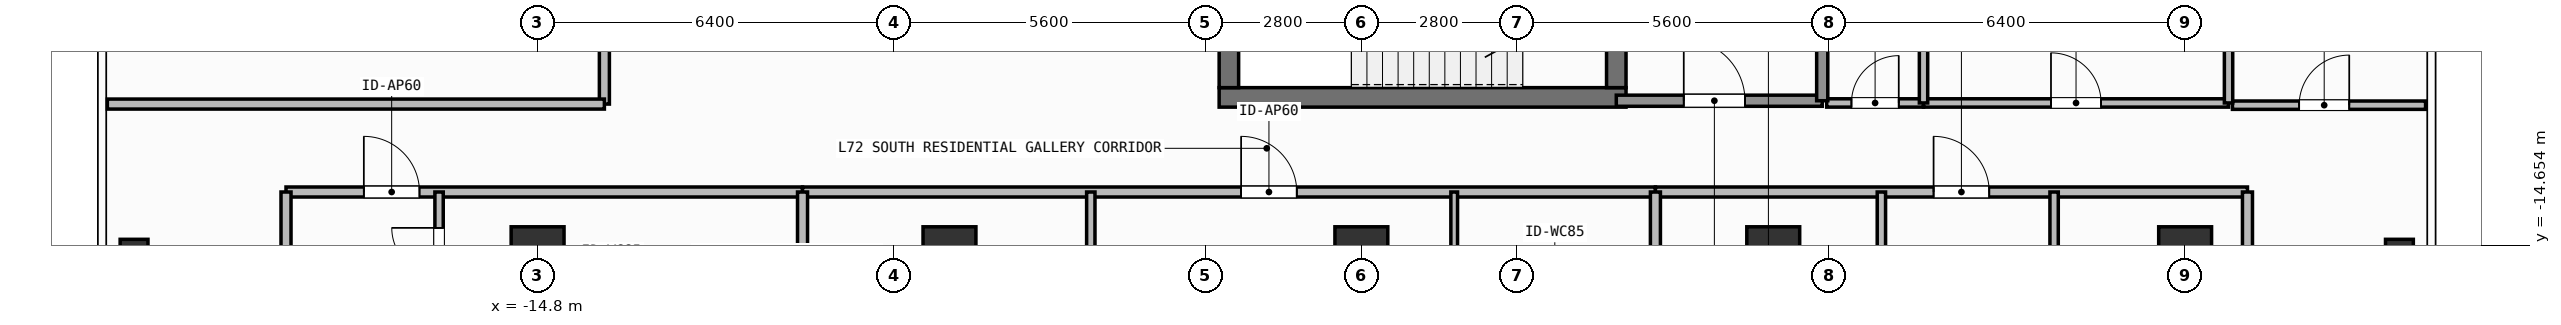
"""IFC4 building model, lengths in metres.
Left out: names, types, materials, properties, quantities, classifications, styles, units other than length and angle.
Written with IfcOpenShell. Run it as: python <this file> out.ifc"""

import sys

from ifc_helpers import new_model, si_unit, direction, frame, frame_2d, origin, origin_2d, place, context, subcontext, project, spatial, rectangle, hollow_rectangle, extrude, element, fill, save


model = new_model("IFC4")
c1 = context("Model", 3, precision=1e-05, world=origin(), true_north=direction((0.0, 1.0)))
c2 = subcontext(c1, "Body", "Model", "MODEL_VIEW")
j1 = project(units=[si_unit("LENGTHUNIT", "METRE"), si_unit("PLANEANGLEUNIT", "RADIAN")], contexts=[c1])
p1 = place(None, origin())
s1 = spatial("IfcSite", under=j1, at=p1, CompositionType="ELEMENT")
p2 = place(p1, origin())
s2 = spatial("IfcBuilding", under=s1, at=p2, CompositionType="ELEMENT")
p3 = place(p2, frame((0.0, 0.0, 293.7)))
s3 = spatial("IfcBuildingStorey", under=s2, at=p3, CompositionType="ELEMENT", Elevation=293.7)
p4 = place(p3, frame((-2.555, -12.0, 0.0), z_axis=(0.0, 0.0, 1.0), x_axis=(1.0, 0.0, 0.0)))
e1 = element("IfcWall", 1, at=p4, inside=s3, PredefinedType="SHEAR", context=c2, shape_type="SweptSolid", body=[
    extrude(rectangle(XDim=7.31, YDim=0.35, at=frame_2d((3.655, 0.0))), origin(), (0.0, 0.0, 1.0), 3.9),
])
p5 = place(p3, frame((-2.38, -11.825, 0.0), z_axis=(0.0, 0.0, 1.0), x_axis=(0.0, 1.0, 0.0)))
e2 = element("IfcWall", 2, at=p5, inside=s3, PredefinedType="SHEAR", context=c2, shape_type="SweptSolid", body=[
    extrude(rectangle(XDim=2.925, YDim=0.35, at=frame_2d((1.462, 0.0))), origin(), (0.0, 0.0, 1.0), 3.9),
])
p6 = place(p3, frame((4.58, -8.9, 0.0), z_axis=(0.0, 0.0, 1.0), x_axis=(0.0, -1.0, 0.0)))
e3 = element("IfcWall", 3, at=p6, inside=s3, PredefinedType="SHEAR", context=c2, shape_type="SweptSolid", body=[
    extrude(rectangle(XDim=2.925, YDim=0.35, at=frame_2d((1.462, 0.0))), origin(), (0.0, 0.0, 1.0), 3.9),
])
p7 = place(p6, frame((0.913, 0.0, 0.0)))
e4 = element("IfcOpeningElement", 4, at=p7, cuts=e3, PredefinedType="OPENING", context=c2, shape_type="SweptSolid", body=[
    extrude(rectangle(XDim=1.1, YDim=2.15, at=frame_2d((0.55, 1.075))), frame((0.0, 0.185, 0.0), z_axis=(0.0, -1.0, 0.0), x_axis=(1.0, 0.0, 0.0)), (0.0, 0.0, 1.0), 0.37),
])
for number, where, z_axis, x_axis in (
    (5, (-14.8, -14.8, 0.0), (0.0, 0.0, 1.0), (1.0, 0.0, 0.0)),
    (6, (-7.4, -14.8, 0.0), (0.0, 0.0, 1.0), (1.0, 0.0, 0.0)),
    (7, (0.0, -14.8, 0.0), (0.0, 0.0, 1.0), (1.0, 0.0, 0.0)),
    (8, (7.4, -14.8, 0.0), (0.0, 0.0, 1.0), (1.0, 0.0, 0.0)),
    (9, (14.8, -14.8, 0.0), (0.0, 0.0, 1.0), (1.0, 0.0, 0.0)),
):
    element("IfcColumn", number, at=place(p3, frame(where, z_axis=z_axis, x_axis=x_axis)), inside=s3, PredefinedType="COLUMN", context=c2, shape_type="SweptSolid", body=[
        extrude(rectangle(XDim=0.95, YDim=0.95, at=origin_2d()), origin(), (0.0, 0.0, 1.0), 3.9),
    ])
for number, where, z_axis, x_axis in (
    (10, (-22.05, -14.8, 0.0), (0.0, 0.0, 1.0), (1.0, 0.0, 0.0)),
    (11, (18.65, -14.8, 0.0), (0.0, 0.0, 1.0), (1.0, 0.0, 0.0)),
):
    element("IfcColumn", number, at=place(p3, frame(where, z_axis=z_axis, x_axis=x_axis)), inside=s3, PredefinedType="COLUMN", context=c2, shape_type="SweptSolid", body=[
        extrude(hollow_rectangle(XDim=0.5, YDim=0.5, WallThickness=0.025, at=origin_2d()), origin(), (0.0, 0.0, 1.0), 3.9),
    ])
p8 = place(p3, frame((4.58, -12.06, 0.0), z_axis=(0.0, 0.0, 1.0), x_axis=(1.0, 0.0, 0.0)))
e12 = element("IfcWall", 12, at=p8, inside=s3, PredefinedType="SOLIDWALL", context=c2, shape_type="SweptSolid", body=[
    extrude(rectangle(XDim=3.7, YDim=0.2, at=frame_2d((1.85, 0.0))), origin(), (0.0, 0.0, 1.0), 3.68),
])
p9 = place(p8, frame((1.212, 0.0, 0.0)))
e13 = element("IfcOpeningElement", 13, at=p9, cuts=e12, PredefinedType="OPENING", context=c2, shape_type="SweptSolid", body=[
    extrude(rectangle(XDim=1.1, YDim=2.15, at=frame_2d((0.55, 1.075))), frame((0.0, 0.11, 0.0), z_axis=(0.0, -1.0, 0.0), x_axis=(1.0, 0.0, 0.0)), (0.0, 0.0, 1.0), 0.22),
])
p10 = place(p3, frame((8.36, -12.1, 0.0), z_axis=(0.0, 0.0, 1.0), x_axis=(1.0, 0.0, 0.0)))
e14 = element("IfcWall", 14, at=p10, inside=s3, PredefinedType="PARTITIONING", context=c2, shape_type="SweptSolid", body=[
    extrude(rectangle(XDim=1.74, YDim=0.15, at=frame_2d((0.87, 0.0))), origin(), (0.0, 0.0, 1.0), 3.68),
])
p11 = place(p10, frame((0.445, 0.0, 0.0)))
e15 = element("IfcOpeningElement", 15, at=p11, cuts=e14, PredefinedType="OPENING", context=c2, shape_type="SweptSolid", body=[
    extrude(rectangle(XDim=0.85, YDim=2.1, at=frame_2d((0.425, 1.05))), frame((0.0, 0.085, 0.0), z_axis=(0.0, -1.0, 0.0), x_axis=(1.0, 0.0, 0.0)), (0.0, 0.0, 1.0), 0.17),
])
p12 = place(p3, frame((10.1, -12.1, 0.0), z_axis=(0.0, 0.0, 1.0), x_axis=(1.0, 0.0, 0.0)))
e16 = element("IfcWall", 16, at=p12, inside=s3, PredefinedType="PARTITIONING", context=c2, shape_type="SweptSolid", body=[
    extrude(rectangle(XDim=5.48, YDim=0.15, at=frame_2d((2.74, 0.0))), origin(), (0.0, 0.0, 1.0), 3.68),
])
p13 = place(p12, frame((2.29, 0.0, 0.0)))
e17 = element("IfcOpeningElement", 17, at=p13, cuts=e16, PredefinedType="OPENING", context=c2, shape_type="SweptSolid", body=[
    extrude(rectangle(XDim=0.9, YDim=2.1, at=frame_2d((0.45, 1.05))), frame((0.0, 0.085, 0.0), z_axis=(0.0, -1.0, 0.0), x_axis=(1.0, 0.0, 0.0)), (0.0, 0.0, 1.0), 0.17),
])
p14 = place(p3, frame((-19.32, -13.7, 0.0), z_axis=(0.0, 0.0, 1.0), x_axis=(1.0, 0.0, 0.0)))
e18 = element("IfcWall", 18, at=p14, inside=s3, PredefinedType="PARTITIONING", context=c2, shape_type="SweptSolid", body=[
    extrude(rectangle(XDim=9.28, YDim=0.18, at=frame_2d((4.64, 0.0))), origin(), (0.0, 0.0, 1.0), 3.68),
])
p15 = place(p14, frame((1.398, 0.0, 0.0)))
e19 = element("IfcOpeningElement", 19, at=p15, cuts=e18, PredefinedType="OPENING", context=c2, shape_type="SweptSolid", body=[
    extrude(rectangle(XDim=1.0, YDim=2.2, at=frame_2d((0.5, 1.1))), frame((0.0, 0.1, 0.0), z_axis=(0.0, -1.0, 0.0), x_axis=(1.0, 0.0, 0.0)), (0.0, 0.0, 1.0), 0.2),
])
p16 = place(p3, frame((-16.57, -15.839, 0.0), z_axis=(0.0, 0.0, 1.0), x_axis=(0.0, 1.0, 0.0)))
e20 = element("IfcWall", 20, at=p16, inside=s3, PredefinedType="PARTITIONING", context=c2, shape_type="SweptSolid", body=[
    extrude(rectangle(XDim=2.139, YDim=0.15, at=frame_2d((1.07, 0.0))), origin(), (0.0, 0.0, 1.0), 3.68),
])
p17 = place(p16, frame((0.645, 0.0, 0.0)))
e21 = element("IfcOpeningElement", 21, at=p17, cuts=e20, PredefinedType="OPENING", context=c2, shape_type="SweptSolid", body=[
    extrude(rectangle(XDim=0.85, YDim=2.1, at=frame_2d((0.425, 1.05))), frame((0.0, 0.085, 0.0), z_axis=(0.0, -1.0, 0.0), x_axis=(1.0, 0.0, 0.0)), (0.0, 0.0, 1.0), 0.17),
])
p18 = place(p3, frame((-10.04, -13.7, 0.0), z_axis=(0.0, 0.0, 1.0), x_axis=(1.0, 0.0, 0.0)))
e22 = element("IfcWall", 22, at=p18, inside=s3, PredefinedType="PARTITIONING", context=c2, shape_type="SweptSolid", body=[
    extrude(rectangle(XDim=15.323, YDim=0.18, at=frame_2d((7.662, 0.0))), origin(), (0.0, 0.0, 1.0), 3.68),
])
p19 = place(p18, frame((7.88, 0.0, 0.0)))
e23 = element("IfcOpeningElement", 23, at=p19, cuts=e22, PredefinedType="OPENING", context=c2, shape_type="SweptSolid", body=[
    extrude(rectangle(XDim=1.0, YDim=2.2, at=frame_2d((0.5, 1.1))), frame((0.0, 0.1, 0.0), z_axis=(0.0, -1.0, 0.0), x_axis=(1.0, 0.0, 0.0)), (0.0, 0.0, 1.0), 0.2),
])
p20 = place(p3, frame((-4.861, -17.59, 0.0), z_axis=(0.0, 0.0, 1.0), x_axis=(0.0, 1.0, 0.0)))
e24 = element("IfcWall", 24, at=p20, inside=s3, PredefinedType="PARTITIONING", context=c2, shape_type="SweptSolid", body=[
    extrude(rectangle(XDim=3.89, YDim=0.15, at=frame_2d((1.945, 0.0))), origin(), (0.0, 0.0, 1.0), 3.68),
])
p21 = place(p20, frame((1.52, 0.0, 0.0)))
e25 = element("IfcOpeningElement", 25, at=p21, cuts=e24, PredefinedType="OPENING", context=c2, shape_type="SweptSolid", body=[
    extrude(rectangle(XDim=0.85, YDim=2.1, at=frame_2d((0.425, 1.05))), frame((0.0, 0.085, 0.0), z_axis=(0.0, -1.0, 0.0), x_axis=(1.0, 0.0, 0.0)), (0.0, 0.0, 1.0), 0.17),
])
p22 = place(p3, frame((1.668, -15.878, 0.0), z_axis=(0.0, 0.0, 1.0), x_axis=(0.0, 1.0, 0.0)))
e26 = element("IfcWall", 26, at=p22, inside=s3, PredefinedType="PARTITIONING", context=c2, shape_type="SweptSolid", body=[
    extrude(rectangle(XDim=2.178, YDim=0.12, at=frame_2d((1.089, 0.0))), origin(), (0.0, 0.0, 1.0), 3.68),
])
p23 = place(p3, frame((5.283, -13.7, 0.0), z_axis=(0.0, 0.0, 1.0), x_axis=(1.0, 0.0, 0.0)))
e27 = element("IfcWall", 27, at=p23, inside=s3, PredefinedType="PARTITIONING", context=c2, shape_type="SweptSolid", body=[
    extrude(rectangle(XDim=10.637, YDim=0.18, at=frame_2d((5.318, 0.0))), origin(), (0.0, 0.0, 1.0), 3.68),
])
p24 = place(p23, frame((4.998, 0.0, 0.0)))
e28 = element("IfcOpeningElement", 28, at=p24, cuts=e27, PredefinedType="OPENING", context=c2, shape_type="SweptSolid", body=[
    extrude(rectangle(XDim=1.0, YDim=2.2, at=frame_2d((0.5, 1.1))), frame((0.0, 0.1, 0.0), z_axis=(0.0, -1.0, 0.0), x_axis=(1.0, 0.0, 0.0)), (0.0, 0.0, 1.0), 0.2),
])
p25 = place(p3, frame((9.343, -17.461, 0.0), z_axis=(0.0, 0.0, 1.0), x_axis=(0.0, 1.0, 0.0)))
e29 = element("IfcWall", 29, at=p25, inside=s3, PredefinedType="PARTITIONING", context=c2, shape_type="SweptSolid", body=[
    extrude(rectangle(XDim=3.761, YDim=0.15, at=frame_2d((1.88, 0.0))), origin(), (0.0, 0.0, 1.0), 3.68),
])
p26 = place(p25, frame((1.369, 0.0, 0.0)))
e30 = element("IfcOpeningElement", 30, at=p26, cuts=e29, PredefinedType="OPENING", context=c2, shape_type="SweptSolid", body=[
    extrude(rectangle(XDim=0.85, YDim=2.1, at=frame_2d((0.425, 1.05))), frame((0.0, 0.085, 0.0), z_axis=(0.0, -1.0, 0.0), x_axis=(1.0, 0.0, 0.0)), (0.0, 0.0, 1.0), 0.17),
])
p27 = place(p3, frame((12.446, -17.461, 0.0), z_axis=(0.0, 0.0, 1.0), x_axis=(0.0, 1.0, 0.0)))
e31 = element("IfcWall", 31, at=p27, inside=s3, PredefinedType="PARTITIONING", context=c2, shape_type="SweptSolid", body=[
    extrude(rectangle(XDim=3.761, YDim=0.15, at=frame_2d((1.88, 0.0))), origin(), (0.0, 0.0, 1.0), 3.68),
])
p28 = place(p27, frame((1.369, 0.0, 0.0)))
e32 = element("IfcOpeningElement", 32, at=p28, cuts=e31, PredefinedType="OPENING", context=c2, shape_type="SweptSolid", body=[
    extrude(rectangle(XDim=0.85, YDim=2.1, at=frame_2d((0.425, 1.05))), frame((0.0, 0.085, 0.0), z_axis=(0.0, -1.0, 0.0), x_axis=(1.0, 0.0, 0.0)), (0.0, 0.0, 1.0), 0.17),
])
p29 = place(p3, frame((-13.6, -12.12, 0.0), z_axis=(0.0, 0.0, 1.0), x_axis=(0.0, 1.0, 0.0)))
e33 = element("IfcWall", 33, at=p29, inside=s3, PredefinedType="PARTITIONING", context=c2, shape_type="SweptSolid", body=[
    extrude(rectangle(XDim=9.68, YDim=0.18, at=frame_2d((4.84, 0.0))), origin(), (0.0, 0.0, 1.0), 3.68),
])
p30 = place(p29, frame((3.006, 0.0, 0.0)))
e34 = element("IfcOpeningElement", 34, at=p30, cuts=e33, PredefinedType="OPENING", context=c2, shape_type="SweptSolid", body=[
    extrude(rectangle(XDim=1.0, YDim=2.2, at=frame_2d((0.5, 1.1))), frame((0.0, 0.1, 0.0), z_axis=(0.0, -1.0, 0.0), x_axis=(1.0, 0.0, 0.0)), (0.0, 0.0, 1.0), 0.2),
])
p31 = place(p3, frame((15.65, -12.14, 0.0), z_axis=(0.0, 0.0, 1.0), x_axis=(1.0, 0.0, 0.0)))
e35 = element("IfcWall", 35, at=p31, inside=s3, PredefinedType="PARTITIONING", context=c2, shape_type="SweptSolid", body=[
    extrude(rectangle(XDim=3.47, YDim=0.15, at=frame_2d((1.735, 0.0))), origin(), (0.0, 0.0, 1.0), 3.68),
])
p32 = place(p31, frame((1.198, 0.0, 0.0)))
e36 = element("IfcOpeningElement", 36, at=p32, cuts=e35, PredefinedType="OPENING", context=c2, shape_type="SweptSolid", body=[
    extrude(rectangle(XDim=0.9, YDim=2.1, at=frame_2d((0.45, 1.05))), frame((0.0, 0.085, 0.0), z_axis=(0.0, -1.0, 0.0), x_axis=(1.0, 0.0, 0.0)), (0.0, 0.0, 1.0), 0.17),
])
p33 = place(p3, frame((8.28, -12.06, 0.0), z_axis=(0.0, 0.0, 1.0), x_axis=(0.0, 1.0, 0.0)))
e37 = element("IfcWall", 37, at=p33, inside=s3, PredefinedType="SOLIDWALL", context=c2, shape_type="SweptSolid", body=[
    extrude(rectangle(XDim=3.335, YDim=0.2, at=frame_2d((1.667, 0.0))), origin(), (0.0, 0.0, 1.0), 3.68),
])
p34 = place(p3, frame((10.1, -12.1, 0.0), z_axis=(0.0, 0.0, 1.0), x_axis=(0.0, 1.0, 0.0)))
e38 = element("IfcWall", 38, at=p34, inside=s3, PredefinedType="PARTITIONING", context=c2, shape_type="SweptSolid", body=[
    extrude(rectangle(XDim=2.35, YDim=0.15, at=frame_2d((1.175, 0.0))), origin(), (0.0, 0.0, 1.0), 3.68),
])
p35 = place(p3, frame((15.58, -12.1, 0.0), z_axis=(0.0, 0.0, 1.0), x_axis=(0.0, 1.0, 0.0)))
e39 = element("IfcWall", 39, at=p35, inside=s3, PredefinedType="PARTITIONING", context=c2, shape_type="SweptSolid", body=[
    extrude(rectangle(XDim=6.25, YDim=0.15, at=frame_2d((3.125, 0.0))), origin(), (0.0, 0.0, 1.0), 3.68),
])
for number, where, z_axis, x_axis in (
    (40, (-19.32, -19.51, 0.0), (0.0, 0.0, 1.0), (0.0, 1.0, 0.0)),
    (41, (15.92, -19.51, 0.0), (0.0, 0.0, 1.0), (0.0, 1.0, 0.0)),
):
    element("IfcWall", number, at=place(p3, frame(where, z_axis=z_axis, x_axis=x_axis)), inside=s3, PredefinedType="PARTITIONING", context=c2, shape_type="SweptSolid", body=[
        extrude(rectangle(XDim=5.81, YDim=0.18, at=frame_2d((2.905, 0.0))), origin(), (0.0, 0.0, 1.0), 3.68),
    ])
for number, where, z_axis, x_axis in (
    (42, (-10.04, -20.63, 0.0), (0.0, 0.0, 1.0), (0.0, 1.0, 0.0)),
    (43, (5.283, -20.63, 0.0), (0.0, 0.0, 1.0), (0.0, 1.0, 0.0)),
):
    element("IfcWall", number, at=place(p3, frame(where, z_axis=z_axis, x_axis=x_axis)), inside=s3, PredefinedType="PARTITIONING", context=c2, shape_type="SweptSolid", body=[
        extrude(rectangle(XDim=6.93, YDim=0.18, at=frame_2d((3.465, 0.0))), origin(), (0.0, 0.0, 1.0), 3.68),
    ])
p36 = place(p3, frame((-22.53, -12.12, 0.0), z_axis=(0.0, 0.0, 1.0), x_axis=(1.0, 0.0, 0.0)))
e44 = element("IfcWall", 44, at=p36, inside=s3, PredefinedType="PARTITIONING", context=c2, shape_type="SweptSolid", body=[
    extrude(rectangle(XDim=8.93, YDim=0.18, at=frame_2d((4.465, 0.0))), origin(), (0.0, 0.0, 1.0), 3.68),
])
p37 = place(p9, origin())
e45 = element("IfcDoor", 45, at=p37, inside=s3, OperationType="SINGLE_SWING_LEFT", PredefinedType="DOOR", context=c2, shape_type="SweptSolid", body=[
    extrude(rectangle(XDim=1.1, YDim=2.15, at=frame_2d((0.55, 1.075))), frame((0.0, 0.025, 0.0), z_axis=(0.0, -1.0, 0.0), x_axis=(1.0, 0.0, 0.0)), (0.0, 0.0, 1.0), 0.05),
])
fill(e13, e45)
p38 = place(p11, origin())
e46 = element("IfcDoor", 46, at=p38, inside=s3, OperationType="SINGLE_SWING_RIGHT", PredefinedType="DOOR", context=c2, shape_type="SweptSolid", body=[
    extrude(rectangle(XDim=0.85, YDim=2.1, at=frame_2d((0.425, 1.05))), frame((0.0, 0.025, 0.0), z_axis=(0.0, -1.0, 0.0), x_axis=(1.0, 0.0, 0.0)), (0.0, 0.0, 1.0), 0.05),
])
fill(e15, e46)
p39 = place(p13, origin())
e47 = element("IfcDoor", 47, at=p39, inside=s3, OperationType="SINGLE_SWING_LEFT", PredefinedType="DOOR", context=c2, shape_type="SweptSolid", body=[
    extrude(rectangle(XDim=0.9, YDim=2.1, at=frame_2d((0.45, 1.05))), frame((0.0, 0.025, 0.0), z_axis=(0.0, -1.0, 0.0), x_axis=(1.0, 0.0, 0.0)), (0.0, 0.0, 1.0), 0.05),
])
fill(e17, e47)
p40 = place(p15, origin())
e48 = element("IfcDoor", 48, at=p40, inside=s3, OperationType="SINGLE_SWING_LEFT", PredefinedType="DOOR", context=c2, shape_type="SweptSolid", body=[
    extrude(rectangle(XDim=1.0, YDim=2.2, at=frame_2d((0.5, 1.1))), frame((0.0, 0.025, 0.0), z_axis=(0.0, -1.0, 0.0), x_axis=(1.0, 0.0, 0.0)), (0.0, 0.0, 1.0), 0.05),
])
fill(e19, e48)
p41 = place(p17, origin())
e49 = element("IfcDoor", 49, at=p41, inside=s3, OperationType="SINGLE_SWING_RIGHT", PredefinedType="DOOR", context=c2, shape_type="SweptSolid", body=[
    extrude(rectangle(XDim=0.85, YDim=2.1, at=frame_2d((0.425, 1.05))), frame((0.0, 0.025, 0.0), z_axis=(0.0, -1.0, 0.0), x_axis=(1.0, 0.0, 0.0)), (0.0, 0.0, 1.0), 0.05),
])
fill(e21, e49)
p42 = place(p19, origin())
e50 = element("IfcDoor", 50, at=p42, inside=s3, OperationType="SINGLE_SWING_LEFT", PredefinedType="DOOR", context=c2, shape_type="SweptSolid", body=[
    extrude(rectangle(XDim=1.0, YDim=2.2, at=frame_2d((0.5, 1.1))), frame((0.0, 0.025, 0.0), z_axis=(0.0, -1.0, 0.0), x_axis=(1.0, 0.0, 0.0)), (0.0, 0.0, 1.0), 0.05),
])
fill(e23, e50)
p43 = place(p24, origin())
e51 = element("IfcDoor", 51, at=p43, inside=s3, OperationType="SINGLE_SWING_LEFT", PredefinedType="DOOR", context=c2, shape_type="SweptSolid", body=[
    extrude(rectangle(XDim=1.0, YDim=2.2, at=frame_2d((0.5, 1.1))), frame((0.0, 0.025, 0.0), z_axis=(0.0, -1.0, 0.0), x_axis=(1.0, 0.0, 0.0)), (0.0, 0.0, 1.0), 0.05),
])
fill(e28, e51)
p44 = place(p32, origin())
e52 = element("IfcDoor", 52, at=p44, inside=s3, OperationType="SINGLE_SWING_RIGHT", PredefinedType="DOOR", context=c2, shape_type="SweptSolid", body=[
    extrude(rectangle(XDim=0.9, YDim=2.1, at=frame_2d((0.45, 1.05))), frame((0.0, 0.025, 0.0), z_axis=(0.0, -1.0, 0.0), x_axis=(1.0, 0.0, 0.0)), (0.0, 0.0, 1.0), 0.05),
])
fill(e36, e52)
save(model, sys.argv[1])
